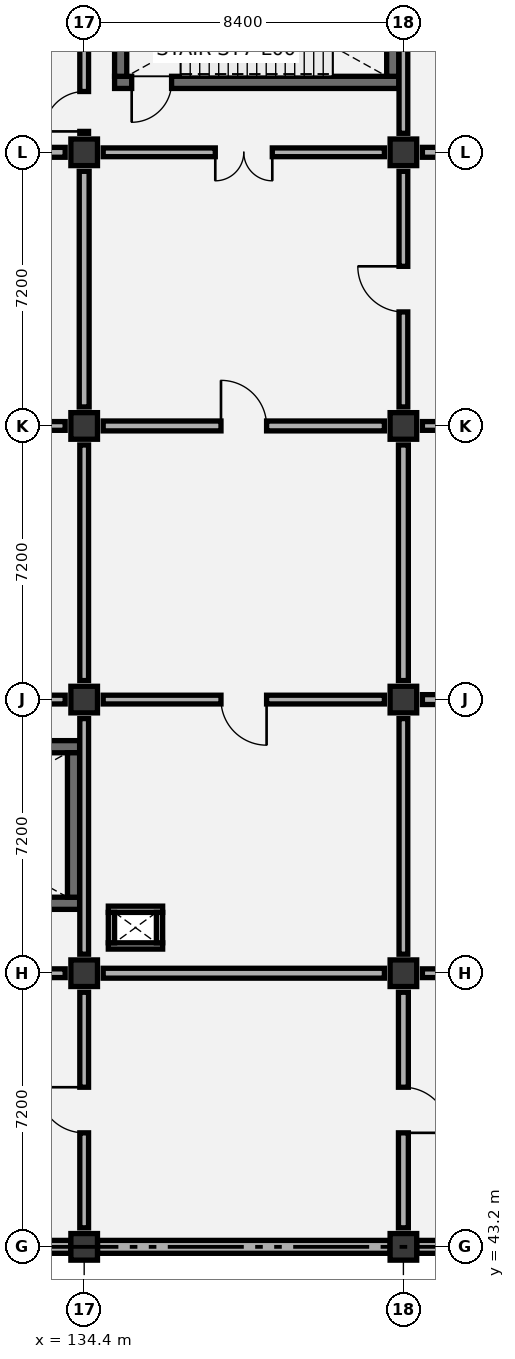
"""IFC4 building model, lengths in metres.
Left out: names, types, materials, properties, quantities, classifications, styles, units other than length and angle.
Written with IfcOpenShell. Run it as: python <this file> out.ifc"""

import sys

from ifc_helpers import new_model, si_unit, direction, frame, frame_2d, origin, origin_2d, place, context, subcontext, project, spatial, rectangle, extrude, element, fill, save


model = new_model("IFC4")
c1 = context("Model", 3, precision=1e-05, world=origin(), true_north=direction((0.0, 1.0)))
c2 = subcontext(c1, "Body", "Model", "MODEL_VIEW")
j1 = project(units=[si_unit("LENGTHUNIT", "METRE"), si_unit("PLANEANGLEUNIT", "RADIAN")], contexts=[c1])
p1 = place(None, origin())
s1 = spatial("IfcSite", under=j1, at=p1, CompositionType="ELEMENT")
p2 = place(p1, origin())
s2 = spatial("IfcBuilding", under=s1, at=p2, CompositionType="ELEMENT")
p3 = place(p2, origin())
s3 = spatial("IfcBuildingStorey", under=s2, at=p3, CompositionType="ELEMENT", Elevation=0.0)
for number, where, z_axis, x_axis in (
    (1, (134.4, 43.2, 0.0), (0.0, 0.0, 1.0), (1.0, 0.0, 0.0)),
    (2, (134.4, 50.4, 0.0), (0.0, 0.0, 1.0), (1.0, 0.0, 0.0)),
    (3, (134.4, 57.6, 0.0), (0.0, 0.0, 1.0), (1.0, 0.0, 0.0)),
    (4, (134.4, 64.8, 0.0), (0.0, 0.0, 1.0), (1.0, 0.0, 0.0)),
    (5, (134.4, 72.0, 0.0), (0.0, 0.0, 1.0), (1.0, 0.0, 0.0)),
    (6, (142.8, 43.2, 0.0), (0.0, 0.0, 1.0), (1.0, 0.0, 0.0)),
    (7, (142.8, 50.4, 0.0), (0.0, 0.0, 1.0), (1.0, 0.0, 0.0)),
    (8, (142.8, 57.6, 0.0), (0.0, 0.0, 1.0), (1.0, 0.0, 0.0)),
    (9, (142.8, 64.8, 0.0), (0.0, 0.0, 1.0), (1.0, 0.0, 0.0)),
    (10, (142.8, 72.0, 0.0), (0.0, 0.0, 1.0), (1.0, 0.0, 0.0)),
):
    element("IfcColumn", number, at=place(p3, frame(where, z_axis=z_axis, x_axis=x_axis)), inside=s3, PredefinedType="COLUMN", context=c2, shape_type="SweptSolid", body=[
        extrude(rectangle(XDim=0.7, YDim=0.7, at=origin_2d()), origin(), (0.0, 0.0, 1.0), 6.0),
    ])
p4 = place(p3, frame((126.8, 52.24, 0.0), z_axis=(0.0, 0.0, 1.0), x_axis=(1.0, 0.0, 0.0)))
e11 = element("IfcWall", 11, at=p4, inside=s3, PredefinedType="SHEAR", context=c2, shape_type="SweptSolid", body=[
    extrude(rectangle(XDim=7.48, YDim=0.32, at=frame_2d((3.74, 0.0))), origin(), (0.0, 0.0, 1.0), 5.675),
])
p5 = place(p4, frame((0.45, 0.0, 0.0)))
e12 = element("IfcOpeningElement", 12, at=p5, cuts=e11, PredefinedType="OPENING", context=c2, shape_type="SweptSolid", body=[
    extrude(rectangle(XDim=1.05, YDim=2.15, at=frame_2d((0.525, 1.075))), frame((0.0, 0.17, 0.0), z_axis=(0.0, -1.0, 0.0), x_axis=(1.0, 0.0, 0.0)), (0.0, 0.0, 1.0), 0.34),
])
p6 = place(p3, frame((126.8, 56.36, 0.0), z_axis=(0.0, 0.0, 1.0), x_axis=(1.0, 0.0, 0.0)))
e13 = element("IfcWall", 13, at=p6, inside=s3, PredefinedType="SHEAR", context=c2, shape_type="SweptSolid", body=[
    extrude(rectangle(XDim=7.48, YDim=0.32, at=frame_2d((3.74, 0.0))), origin(), (0.0, 0.0, 1.0), 5.675),
])
p7 = place(p3, frame((134.12, 52.4, 0.0), z_axis=(0.0, 0.0, 1.0), x_axis=(0.0, 1.0, 0.0)))
e14 = element("IfcWall", 14, at=p7, inside=s3, PredefinedType="SHEAR", context=c2, shape_type="SweptSolid", body=[
    extrude(rectangle(XDim=3.8, YDim=0.32, at=frame_2d((1.9, 0.0))), origin(), (0.0, 0.0, 1.0), 5.675),
])
p8 = place(p3, frame((135.2, 73.84, 0.0), z_axis=(0.0, 0.0, 1.0), x_axis=(1.0, 0.0, 0.0)))
e15 = element("IfcWall", 15, at=p8, inside=s3, PredefinedType="SHEAR", context=c2, shape_type="SweptSolid", body=[
    extrude(rectangle(XDim=7.48, YDim=0.32, at=frame_2d((3.74, 0.0))), origin(), (0.0, 0.0, 1.0), 5.675),
])
p9 = place(p8, frame((0.45, 0.0, 0.0)))
e16 = element("IfcOpeningElement", 16, at=p9, cuts=e15, PredefinedType="OPENING", context=c2, shape_type="SweptSolid", body=[
    extrude(rectangle(XDim=1.05, YDim=2.15, at=frame_2d((0.525, 1.075))), frame((0.0, 0.17, 0.0), z_axis=(0.0, -1.0, 0.0), x_axis=(1.0, 0.0, 0.0)), (0.0, 0.0, 1.0), 0.34),
])
for number, where, z_axis, x_axis in (
    (17, (135.36, 74.0, 0.0), (0.0, 0.0, 1.0), (0.0, 1.0, 0.0)),
    (18, (142.52, 74.0, 0.0), (0.0, 0.0, 1.0), (0.0, 1.0, 0.0)),
):
    element("IfcWall", number, at=place(p3, frame(where, z_axis=z_axis, x_axis=x_axis)), inside=s3, PredefinedType="SHEAR", context=c2, shape_type="SweptSolid", body=[
        extrude(rectangle(XDim=3.8, YDim=0.32, at=frame_2d((1.9, 0.0))), origin(), (0.0, 0.0, 1.0), 5.675),
    ])
for number, where, z_axis, x_axis in (
    (19, (126.35, 43.2, 0.0), (0.0, 0.0, 1.0), (1.0, 0.0, 0.0)),
    (20, (134.75, 43.2, 0.0), (0.0, 0.0, 1.0), (1.0, 0.0, 0.0)),
):
    element("IfcWall", number, at=place(p3, frame(where, z_axis=z_axis, x_axis=x_axis)), inside=s3, PredefinedType="SOLIDWALL", context=c2, shape_type="SweptSolid", body=[
        extrude(rectangle(XDim=7.7, YDim=0.34, at=frame_2d((3.85, 0.0))), origin(), (0.0, 0.0, 1.0), 5.02),
    ])
p10 = place(p3, frame((143.15, 43.2, 0.0), z_axis=(0.0, 0.0, 1.0), x_axis=(1.0, 0.0, 0.0)))
e21 = element("IfcWall", 21, at=p10, inside=s3, PredefinedType="SOLIDWALL", context=c2, shape_type="SweptSolid", body=[
    extrude(rectangle(XDim=7.7, YDim=0.34, at=frame_2d((3.85, 0.0))), origin(), (0.0, 0.0, 1.0), 5.02),
])
for number, where, z_axis, x_axis in (
    (22, (135.035, 51.117, 0.0), (0.0, 0.0, 1.0), (1.0, 0.0, 0.0)),
    (23, (135.035, 52.083, 0.0), (0.0, 0.0, 1.0), (1.0, 0.0, 0.0)),
):
    element("IfcWall", number, at=place(p3, frame(where, z_axis=z_axis, x_axis=x_axis)), inside=s3, PredefinedType="PARTITIONING", context=c2, shape_type="SweptSolid", body=[
        extrude(rectangle(XDim=1.43, YDim=0.165, at=frame_2d((0.715, 0.0))), origin(), (0.0, 0.0, 1.0), 5.675),
    ])
for number, where, z_axis, x_axis in (
    (24, (135.117, 51.2, 0.0), (0.0, 0.0, 1.0), (0.0, 1.0, 0.0)),
    (25, (136.383, 51.2, 0.0), (0.0, 0.0, 1.0), (0.0, 1.0, 0.0)),
):
    element("IfcWall", number, at=place(p3, frame(where, z_axis=z_axis, x_axis=x_axis)), inside=s3, PredefinedType="PARTITIONING", context=c2, shape_type="SweptSolid", body=[
        extrude(rectangle(XDim=0.8, YDim=0.165, at=frame_2d((0.4, 0.0))), origin(), (0.0, 0.0, 1.0), 5.675),
    ])
p11 = place(p3, frame((134.4, 43.7, 0.0), z_axis=(0.0, 0.0, 1.0), x_axis=(0.0, 1.0, 0.0)))
e26 = element("IfcWall", 26, at=p11, inside=s3, PredefinedType="PARTITIONING", context=c2, shape_type="SweptSolid", body=[
    extrude(rectangle(XDim=6.2, YDim=0.23, at=frame_2d((3.1, 0.0))), origin(), (0.0, 0.0, 1.0), 5.17),
])
p12 = place(p11, frame((2.5, 0.0, 0.0)))
e27 = element("IfcOpeningElement", 27, at=p12, cuts=e26, PredefinedType="OPENING", context=c2, shape_type="SweptSolid", body=[
    extrude(rectangle(XDim=1.2, YDim=2.1, at=frame_2d((0.6, 1.05))), frame((0.0, 0.125, 0.0), z_axis=(0.0, -1.0, 0.0), x_axis=(1.0, 0.0, 0.0)), (0.0, 0.0, 1.0), 0.25),
])
p13 = place(p3, frame((126.5, 50.4, 0.0), z_axis=(0.0, 0.0, 1.0), x_axis=(1.0, 0.0, 0.0)))
e28 = element("IfcWall", 28, at=p13, inside=s3, PredefinedType="PARTITIONING", context=c2, shape_type="SweptSolid", body=[
    extrude(rectangle(XDim=7.4, YDim=0.23, at=frame_2d((3.7, 0.0))), origin(), (0.0, 0.0, 1.0), 4.87),
])
p14 = place(p13, frame((2.95, 0.0, 0.0)))
e29 = element("IfcOpeningElement", 29, at=p14, cuts=e28, PredefinedType="OPENING", context=c2, shape_type="SweptSolid", body=[
    extrude(rectangle(XDim=1.5, YDim=2.15, at=frame_2d((0.75, 1.075))), frame((0.0, 0.125, 0.0), z_axis=(0.0, -1.0, 0.0), x_axis=(1.0, 0.0, 0.0)), (0.0, 0.0, 1.0), 0.25),
])
p15 = place(p3, frame((134.4, 50.9, 0.0), z_axis=(0.0, 0.0, 1.0), x_axis=(0.0, 1.0, 0.0)))
e30 = element("IfcWall", 30, at=p15, inside=s3, PredefinedType="PARTITIONING", context=c2, shape_type="SweptSolid", body=[
    extrude(rectangle(XDim=6.2, YDim=0.23, at=frame_2d((3.1, 0.0))), origin(), (0.0, 0.0, 1.0), 4.92),
])
p16 = place(p3, frame((126.5, 57.6, 0.0), z_axis=(0.0, 0.0, 1.0), x_axis=(1.0, 0.0, 0.0)))
e31 = element("IfcWall", 31, at=p16, inside=s3, PredefinedType="PARTITIONING", context=c2, shape_type="SweptSolid", body=[
    extrude(rectangle(XDim=7.4, YDim=0.23, at=frame_2d((3.7, 0.0))), origin(), (0.0, 0.0, 1.0), 4.87),
])
p17 = place(p3, frame((134.4, 58.1, 0.0), z_axis=(0.0, 0.0, 1.0), x_axis=(0.0, 1.0, 0.0)))
e32 = element("IfcWall", 32, at=p17, inside=s3, PredefinedType="PARTITIONING", context=c2, shape_type="SweptSolid", body=[
    extrude(rectangle(XDim=6.2, YDim=0.23, at=frame_2d((3.1, 0.0))), origin(), (0.0, 0.0, 1.0), 5.27),
])
p18 = place(p3, frame((126.5, 64.8, 0.0), z_axis=(0.0, 0.0, 1.0), x_axis=(1.0, 0.0, 0.0)))
e33 = element("IfcWall", 33, at=p18, inside=s3, PredefinedType="PARTITIONING", context=c2, shape_type="SweptSolid", body=[
    extrude(rectangle(XDim=7.4, YDim=0.23, at=frame_2d((3.7, 0.0))), origin(), (0.0, 0.0, 1.0), 4.87),
])
p19 = place(p18, frame((3.1, 0.0, 0.0)))
e34 = element("IfcOpeningElement", 34, at=p19, cuts=e33, PredefinedType="OPENING", context=c2, shape_type="SweptSolid", body=[
    extrude(rectangle(XDim=1.2, YDim=2.1, at=frame_2d((0.6, 1.05))), frame((0.0, 0.125, 0.0), z_axis=(0.0, -1.0, 0.0), x_axis=(1.0, 0.0, 0.0)), (0.0, 0.0, 1.0), 0.25),
])
p20 = place(p3, frame((134.4, 65.3, 0.0), z_axis=(0.0, 0.0, 1.0), x_axis=(0.0, 1.0, 0.0)))
e35 = element("IfcWall", 35, at=p20, inside=s3, PredefinedType="PARTITIONING", context=c2, shape_type="SweptSolid", body=[
    extrude(rectangle(XDim=6.2, YDim=0.26, at=frame_2d((3.1, 0.0))), origin(), (0.0, 0.0, 1.0), 4.92),
])
p21 = place(p3, frame((126.5, 72.0, 0.0), z_axis=(0.0, 0.0, 1.0), x_axis=(1.0, 0.0, 0.0)))
e36 = element("IfcWall", 36, at=p21, inside=s3, PredefinedType="PARTITIONING", context=c2, shape_type="SweptSolid", body=[
    extrude(rectangle(XDim=7.4, YDim=0.26, at=frame_2d((3.7, 0.0))), origin(), (0.0, 0.0, 1.0), 4.87),
])
p22 = place(p21, frame((3.1, 0.0, 0.0)))
e37 = element("IfcOpeningElement", 37, at=p22, cuts=e36, PredefinedType="OPENING", context=c2, shape_type="SweptSolid", body=[
    extrude(rectangle(XDim=1.2, YDim=2.1, at=frame_2d((0.6, 1.05))), frame((0.0, 0.14, 0.0), z_axis=(0.0, -1.0, 0.0), x_axis=(1.0, 0.0, 0.0)), (0.0, 0.0, 1.0), 0.28),
])
p23 = place(p3, frame((134.4, 72.5, 0.0), z_axis=(0.0, 0.0, 1.0), x_axis=(0.0, 1.0, 0.0)))
e38 = element("IfcWall", 38, at=p23, inside=s3, PredefinedType="PARTITIONING", context=c2, shape_type="SweptSolid", body=[
    extrude(rectangle(XDim=6.2, YDim=0.23, at=frame_2d((3.1, 0.0))), origin(), (0.0, 0.0, 1.0), 5.38),
])
p24 = place(p23, frame((0.05, 0.0, 0.0)))
e39 = element("IfcOpeningElement", 39, at=p24, cuts=e38, PredefinedType="OPENING", context=c2, shape_type="SweptSolid", body=[
    extrude(rectangle(XDim=1.05, YDim=2.15, at=frame_2d((0.525, 1.075))), frame((0.0, 0.125, 0.0), z_axis=(0.0, -1.0, 0.0), x_axis=(1.0, 0.0, 0.0)), (0.0, 0.0, 1.0), 0.25),
])
p25 = place(p3, frame((142.8, 43.7, 0.0), z_axis=(0.0, 0.0, 1.0), x_axis=(0.0, 1.0, 0.0)))
e40 = element("IfcWall", 40, at=p25, inside=s3, PredefinedType="PARTITIONING", context=c2, shape_type="SweptSolid", body=[
    extrude(rectangle(XDim=6.2, YDim=0.26, at=frame_2d((3.1, 0.0))), origin(), (0.0, 0.0, 1.0), 4.92),
])
p26 = place(p25, frame((2.5, 0.0, 0.0)))
e41 = element("IfcOpeningElement", 41, at=p26, cuts=e40, PredefinedType="OPENING", context=c2, shape_type="SweptSolid", body=[
    extrude(rectangle(XDim=1.2, YDim=2.1, at=frame_2d((0.6, 1.05))), frame((0.0, 0.14, 0.0), z_axis=(0.0, -1.0, 0.0), x_axis=(1.0, 0.0, 0.0)), (0.0, 0.0, 1.0), 0.28),
])
p27 = place(p3, frame((134.9, 50.4, 0.0), z_axis=(0.0, 0.0, 1.0), x_axis=(1.0, 0.0, 0.0)))
e42 = element("IfcWall", 42, at=p27, inside=s3, PredefinedType="PARTITIONING", context=c2, shape_type="SweptSolid", body=[
    extrude(rectangle(XDim=7.4, YDim=0.26, at=frame_2d((3.7, 0.0))), origin(), (0.0, 0.0, 1.0), 4.87),
])
p28 = place(p3, frame((142.8, 50.9, 0.0), z_axis=(0.0, 0.0, 1.0), x_axis=(0.0, 1.0, 0.0)))
e43 = element("IfcWall", 43, at=p28, inside=s3, PredefinedType="PARTITIONING", context=c2, shape_type="SweptSolid", body=[
    extrude(rectangle(XDim=6.2, YDim=0.23, at=frame_2d((3.1, 0.0))), origin(), (0.0, 0.0, 1.0), 5.27),
])
p29 = place(p3, frame((134.9, 57.6, 0.0), z_axis=(0.0, 0.0, 1.0), x_axis=(1.0, 0.0, 0.0)))
e44 = element("IfcWall", 44, at=p29, inside=s3, PredefinedType="PARTITIONING", context=c2, shape_type="SweptSolid", body=[
    extrude(rectangle(XDim=7.4, YDim=0.23, at=frame_2d((3.7, 0.0))), origin(), (0.0, 0.0, 1.0), 4.87),
])
p30 = place(p29, frame((3.1, 0.0, 0.0)))
e45 = element("IfcOpeningElement", 45, at=p30, cuts=e44, PredefinedType="OPENING", context=c2, shape_type="SweptSolid", body=[
    extrude(rectangle(XDim=1.2, YDim=2.1, at=frame_2d((0.6, 1.05))), frame((0.0, 0.125, 0.0), z_axis=(0.0, -1.0, 0.0), x_axis=(1.0, 0.0, 0.0)), (0.0, 0.0, 1.0), 0.25),
])
p31 = place(p3, frame((142.8, 58.1, 0.0), z_axis=(0.0, 0.0, 1.0), x_axis=(0.0, 1.0, 0.0)))
e46 = element("IfcWall", 46, at=p31, inside=s3, PredefinedType="PARTITIONING", context=c2, shape_type="SweptSolid", body=[
    extrude(rectangle(XDim=6.2, YDim=0.26, at=frame_2d((3.1, 0.0))), origin(), (0.0, 0.0, 1.0), 4.92),
])
p32 = place(p3, frame((134.9, 64.8, 0.0), z_axis=(0.0, 0.0, 1.0), x_axis=(1.0, 0.0, 0.0)))
e47 = element("IfcWall", 47, at=p32, inside=s3, PredefinedType="PARTITIONING", context=c2, shape_type="SweptSolid", body=[
    extrude(rectangle(XDim=7.4, YDim=0.26, at=frame_2d((3.7, 0.0))), origin(), (0.0, 0.0, 1.0), 4.87),
])
p33 = place(p32, frame((3.1, 0.0, 0.0)))
e48 = element("IfcOpeningElement", 48, at=p33, cuts=e47, PredefinedType="OPENING", context=c2, shape_type="SweptSolid", body=[
    extrude(rectangle(XDim=1.2, YDim=2.1, at=frame_2d((0.6, 1.05))), frame((0.0, 0.14, 0.0), z_axis=(0.0, -1.0, 0.0), x_axis=(1.0, 0.0, 0.0)), (0.0, 0.0, 1.0), 0.28),
])
p34 = place(p3, frame((142.8, 65.3, 0.0), z_axis=(0.0, 0.0, 1.0), x_axis=(0.0, 1.0, 0.0)))
e49 = element("IfcWall", 49, at=p34, inside=s3, PredefinedType="PARTITIONING", context=c2, shape_type="SweptSolid", body=[
    extrude(rectangle(XDim=6.2, YDim=0.23, at=frame_2d((3.1, 0.0))), origin(), (0.0, 0.0, 1.0), 5.38),
])
p35 = place(p34, frame((2.5, 0.0, 0.0)))
e50 = element("IfcOpeningElement", 50, at=p35, cuts=e49, PredefinedType="OPENING", context=c2, shape_type="SweptSolid", body=[
    extrude(rectangle(XDim=1.2, YDim=2.1, at=frame_2d((0.6, 1.05))), frame((0.0, 0.125, 0.0), z_axis=(0.0, -1.0, 0.0), x_axis=(1.0, 0.0, 0.0)), (0.0, 0.0, 1.0), 0.25),
])
p36 = place(p3, frame((134.9, 72.0, 0.0), z_axis=(0.0, 0.0, 1.0), x_axis=(1.0, 0.0, 0.0)))
e51 = element("IfcWall", 51, at=p36, inside=s3, PredefinedType="PARTITIONING", context=c2, shape_type="SweptSolid", body=[
    extrude(rectangle(XDim=7.4, YDim=0.23, at=frame_2d((3.7, 0.0))), origin(), (0.0, 0.0, 1.0), 4.87),
])
p37 = place(p36, frame((2.95, 0.0, 0.0)))
e52 = element("IfcOpeningElement", 52, at=p37, cuts=e51, PredefinedType="OPENING", context=c2, shape_type="SweptSolid", body=[
    extrude(rectangle(XDim=1.5, YDim=2.15, at=frame_2d((0.75, 1.075))), frame((0.0, 0.125, 0.0), z_axis=(0.0, -1.0, 0.0), x_axis=(1.0, 0.0, 0.0)), (0.0, 0.0, 1.0), 0.25),
])
p38 = place(p3, frame((142.8, 72.5, 0.0), z_axis=(0.0, 0.0, 1.0), x_axis=(0.0, 1.0, 0.0)))
e53 = element("IfcWall", 53, at=p38, inside=s3, PredefinedType="PARTITIONING", context=c2, shape_type="SweptSolid", body=[
    extrude(rectangle(XDim=6.2, YDim=0.23, at=frame_2d((3.1, 0.0))), origin(), (0.0, 0.0, 1.0), 4.92),
])
p39 = place(p3, frame((143.3, 50.4, 0.0), z_axis=(0.0, 0.0, 1.0), x_axis=(1.0, 0.0, 0.0)))
e54 = element("IfcWall", 54, at=p39, inside=s3, PredefinedType="PARTITIONING", context=c2, shape_type="SweptSolid", body=[
    extrude(rectangle(XDim=7.4, YDim=0.23, at=frame_2d((3.7, 0.0))), origin(), (0.0, 0.0, 1.0), 4.87),
])
p40 = place(p3, frame((143.3, 57.6, 0.0), z_axis=(0.0, 0.0, 1.0), x_axis=(1.0, 0.0, 0.0)))
e55 = element("IfcWall", 55, at=p40, inside=s3, PredefinedType="PARTITIONING", context=c2, shape_type="SweptSolid", body=[
    extrude(rectangle(XDim=7.4, YDim=0.26, at=frame_2d((3.7, 0.0))), origin(), (0.0, 0.0, 1.0), 4.87),
])
p41 = place(p40, frame((3.1, 0.0, 0.0)))
e56 = element("IfcOpeningElement", 56, at=p41, cuts=e55, PredefinedType="OPENING", context=c2, shape_type="SweptSolid", body=[
    extrude(rectangle(XDim=1.2, YDim=2.1, at=frame_2d((0.6, 1.05))), frame((0.0, 0.14, 0.0), z_axis=(0.0, -1.0, 0.0), x_axis=(1.0, 0.0, 0.0)), (0.0, 0.0, 1.0), 0.28),
])
p42 = place(p3, frame((143.3, 64.8, 0.0), z_axis=(0.0, 0.0, 1.0), x_axis=(1.0, 0.0, 0.0)))
e57 = element("IfcWall", 57, at=p42, inside=s3, PredefinedType="PARTITIONING", context=c2, shape_type="SweptSolid", body=[
    extrude(rectangle(XDim=7.4, YDim=0.23, at=frame_2d((3.7, 0.0))), origin(), (0.0, 0.0, 1.0), 4.87),
])
p43 = place(p42, frame((3.1, 0.0, 0.0)))
e58 = element("IfcOpeningElement", 58, at=p43, cuts=e57, PredefinedType="OPENING", context=c2, shape_type="SweptSolid", body=[
    extrude(rectangle(XDim=1.2, YDim=2.1, at=frame_2d((0.6, 1.05))), frame((0.0, 0.125, 0.0), z_axis=(0.0, -1.0, 0.0), x_axis=(1.0, 0.0, 0.0)), (0.0, 0.0, 1.0), 0.25),
])
p44 = place(p3, frame((143.3, 72.0, 0.0), z_axis=(0.0, 0.0, 1.0), x_axis=(1.0, 0.0, 0.0)))
e59 = element("IfcWall", 59, at=p44, inside=s3, PredefinedType="PARTITIONING", context=c2, shape_type="SweptSolid", body=[
    extrude(rectangle(XDim=7.4, YDim=0.26, at=frame_2d((3.7, 0.0))), origin(), (0.0, 0.0, 1.0), 4.87),
])
p45 = place(p44, frame((3.1, 0.0, 0.0)))
e60 = element("IfcOpeningElement", 60, at=p45, cuts=e59, PredefinedType="OPENING", context=c2, shape_type="SweptSolid", body=[
    extrude(rectangle(XDim=1.2, YDim=2.1, at=frame_2d((0.6, 1.05))), frame((0.0, 0.14, 0.0), z_axis=(0.0, -1.0, 0.0), x_axis=(1.0, 0.0, 0.0)), (0.0, 0.0, 1.0), 0.28),
])
p46 = place(p9, frame((1.05, 0.0, 0.0), z_axis=(0.0, 0.0, 1.0), x_axis=(-1.0, 0.0, 0.0)))
e61 = element("IfcDoor", 61, at=p46, inside=s3, OperationType="SINGLE_SWING_RIGHT", PredefinedType="DOOR", context=c2, shape_type="SweptSolid", body=[
    extrude(rectangle(XDim=1.05, YDim=2.15, at=frame_2d((0.525, 1.075))), frame((0.0, 0.025, 0.0), z_axis=(0.0, -1.0, 0.0), x_axis=(1.0, 0.0, 0.0)), (0.0, 0.0, 1.0), 0.05),
])
fill(e16, e61)
p47 = place(p12, origin())
e62 = element("IfcDoor", 62, at=p47, inside=s3, OperationType="SINGLE_SWING_RIGHT", PredefinedType="DOOR", context=c2, shape_type="SweptSolid", body=[
    extrude(rectangle(XDim=1.2, YDim=2.1, at=frame_2d((0.6, 1.05))), frame((0.0, 0.025, 0.0), z_axis=(0.0, -1.0, 0.0), x_axis=(1.0, 0.0, 0.0)), (0.0, 0.0, 1.0), 0.05),
])
fill(e27, e62)
p48 = place(p24, origin())
e63 = element("IfcDoor", 63, at=p48, inside=s3, OperationType="SINGLE_SWING_LEFT", PredefinedType="DOOR", context=c2, shape_type="SweptSolid", body=[
    extrude(rectangle(XDim=1.05, YDim=2.15, at=frame_2d((0.525, 1.075))), frame((0.0, 0.025, 0.0), z_axis=(0.0, -1.0, 0.0), x_axis=(1.0, 0.0, 0.0)), (0.0, 0.0, 1.0), 0.05),
])
fill(e39, e63)
p49 = place(p26, frame((1.2, 0.0, 0.0), z_axis=(0.0, 0.0, 1.0), x_axis=(-1.0, 0.0, 0.0)))
e64 = element("IfcDoor", 64, at=p49, inside=s3, OperationType="SINGLE_SWING_RIGHT", PredefinedType="DOOR", context=c2, shape_type="SweptSolid", body=[
    extrude(rectangle(XDim=1.2, YDim=2.1, at=frame_2d((0.6, 1.05))), frame((0.0, 0.025, 0.0), z_axis=(0.0, -1.0, 0.0), x_axis=(1.0, 0.0, 0.0)), (0.0, 0.0, 1.0), 0.05),
])
fill(e41, e64)
p50 = place(p30, frame((1.2, 0.0, 0.0), z_axis=(0.0, 0.0, 1.0), x_axis=(-1.0, 0.0, 0.0)))
e65 = element("IfcDoor", 65, at=p50, inside=s3, OperationType="SINGLE_SWING_LEFT", PredefinedType="DOOR", context=c2, shape_type="SweptSolid", body=[
    extrude(rectangle(XDim=1.2, YDim=2.1, at=frame_2d((0.6, 1.05))), frame((0.0, 0.025, 0.0), z_axis=(0.0, -1.0, 0.0), x_axis=(1.0, 0.0, 0.0)), (0.0, 0.0, 1.0), 0.05),
])
fill(e45, e65)
p51 = place(p33, origin())
e66 = element("IfcDoor", 66, at=p51, inside=s3, OperationType="SINGLE_SWING_LEFT", PredefinedType="DOOR", context=c2, shape_type="SweptSolid", body=[
    extrude(rectangle(XDim=1.2, YDim=2.1, at=frame_2d((0.6, 1.05))), frame((0.0, 0.025, 0.0), z_axis=(0.0, -1.0, 0.0), x_axis=(1.0, 0.0, 0.0)), (0.0, 0.0, 1.0), 0.05),
])
fill(e48, e66)
p52 = place(p35, origin())
e67 = element("IfcDoor", 67, at=p52, inside=s3, OperationType="SINGLE_SWING_RIGHT", PredefinedType="DOOR", context=c2, shape_type="SweptSolid", body=[
    extrude(rectangle(XDim=1.2, YDim=2.1, at=frame_2d((0.6, 1.05))), frame((0.0, 0.025, 0.0), z_axis=(0.0, -1.0, 0.0), x_axis=(1.0, 0.0, 0.0)), (0.0, 0.0, 1.0), 0.05),
])
fill(e50, e67)
p53 = place(p37, frame((1.5, 0.0, 0.0), z_axis=(0.0, 0.0, 1.0), x_axis=(-1.0, 0.0, 0.0)))
e68 = element("IfcDoor", 68, at=p53, inside=s3, OperationType="DOUBLE_DOOR_SINGLE_SWING", PredefinedType="DOOR", context=c2, shape_type="SweptSolid", body=[
    extrude(rectangle(XDim=1.5, YDim=2.15, at=frame_2d((0.75, 1.075))), frame((0.0, 0.025, 0.0), z_axis=(0.0, -1.0, 0.0), x_axis=(1.0, 0.0, 0.0)), (0.0, 0.0, 1.0), 0.05),
])
fill(e52, e68)
save(model, sys.argv[1])
